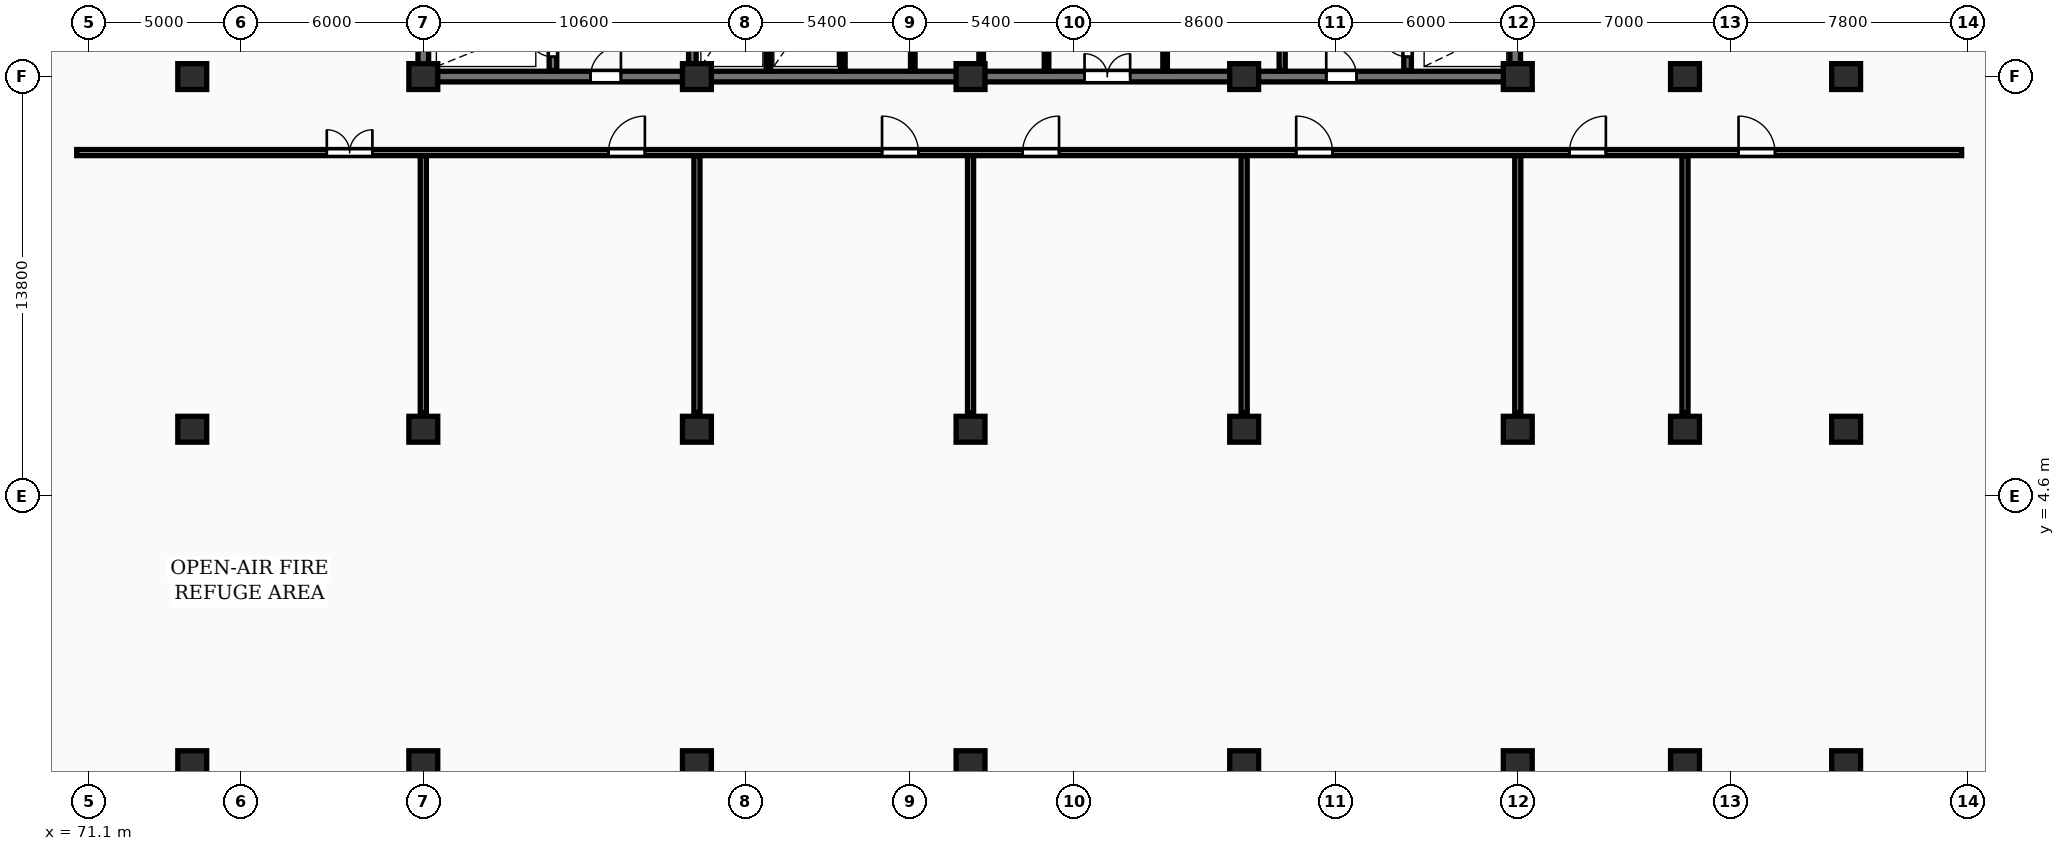
"""IFC4 building model, lengths in metres.
Left out: names, types, materials, properties, quantities, classifications, styles, units other than length and angle.
Written with IfcOpenShell. Run it as: python <this file> out.ifc"""

import sys

from ifc_helpers import new_model, si_unit, direction, frame, frame_2d, origin, origin_2d, place, context, subcontext, project, spatial, rectangle, extrude, element, fill, save


model = new_model("IFC4")
c1 = context("Model", 3, precision=1e-05, world=origin(), true_north=direction((0.0, 1.0)))
c2 = subcontext(c1, "Body", "Model", "MODEL_VIEW")
j1 = project(units=[si_unit("LENGTHUNIT", "METRE"), si_unit("PLANEANGLEUNIT", "RADIAN")], contexts=[c1])
p1 = place(None, origin())
s1 = spatial("IfcSite", under=j1, at=p1, CompositionType="ELEMENT")
p2 = place(p1, origin())
s2 = spatial("IfcBuilding", under=s1, at=p2, CompositionType="ELEMENT")
p3 = place(p2, frame((0.0, 0.0, 76.0)))
s3 = spatial("IfcBuildingStorey", under=s2, at=p3, CompositionType="ELEMENT", Elevation=76.0)
for number, where, z_axis, x_axis in (
    (1, (74.5, -4.2, 0.0), (0.0, 0.0, 1.0), (1.0, 0.0, 0.0)),
    (2, (74.5, 6.8, 0.0), (0.0, 0.0, 1.0), (1.0, 0.0, 0.0)),
    (3, (74.5, 18.4, 0.0), (0.0, 0.0, 1.0), (1.0, 0.0, 0.0)),
    (4, (82.1, -4.2, 0.0), (0.0, 0.0, 1.0), (1.0, 0.0, 0.0)),
    (5, (82.1, 6.8, 0.0), (0.0, 0.0, 1.0), (1.0, 0.0, 0.0)),
    (6, (82.1, 18.4, 0.0), (0.0, 0.0, 1.0), (1.0, 0.0, 0.0)),
    (7, (91.1, -4.2, 0.0), (0.0, 0.0, 1.0), (1.0, 0.0, 0.0)),
    (8, (91.1, 6.8, 0.0), (0.0, 0.0, 1.0), (1.0, 0.0, 0.0)),
    (9, (91.1, 18.4, 0.0), (0.0, 0.0, 1.0), (1.0, 0.0, 0.0)),
    (10, (100.1, -4.2, 0.0), (0.0, 0.0, 1.0), (1.0, 0.0, 0.0)),
    (11, (100.1, 6.8, 0.0), (0.0, 0.0, 1.0), (1.0, 0.0, 0.0)),
    (12, (100.1, 18.4, 0.0), (0.0, 0.0, 1.0), (1.0, 0.0, 0.0)),
    (13, (109.1, -4.2, 0.0), (0.0, 0.0, 1.0), (1.0, 0.0, 0.0)),
    (14, (109.1, 6.8, 0.0), (0.0, 0.0, 1.0), (1.0, 0.0, 0.0)),
    (15, (109.1, 18.4, 0.0), (0.0, 0.0, 1.0), (1.0, 0.0, 0.0)),
    (16, (118.1, -4.2, 0.0), (0.0, 0.0, 1.0), (1.0, 0.0, 0.0)),
    (17, (118.1, 6.8, 0.0), (0.0, 0.0, 1.0), (1.0, 0.0, 0.0)),
    (18, (118.1, 18.4, 0.0), (0.0, 0.0, 1.0), (1.0, 0.0, 0.0)),
    (19, (123.6, -4.2, 0.0), (0.0, 0.0, 1.0), (1.0, 0.0, 0.0)),
    (20, (123.6, 6.8, 0.0), (0.0, 0.0, 1.0), (1.0, 0.0, 0.0)),
    (21, (123.6, 18.4, 0.0), (0.0, 0.0, 1.0), (1.0, 0.0, 0.0)),
    (22, (128.9, -4.2, 0.0), (0.0, 0.0, 1.0), (1.0, 0.0, 0.0)),
    (23, (128.9, 6.8, 0.0), (0.0, 0.0, 1.0), (1.0, 0.0, 0.0)),
    (24, (128.9, 18.4, 0.0), (0.0, 0.0, 1.0), (1.0, 0.0, 0.0)),
):
    element("IfcColumn", number, at=place(p3, frame(where, z_axis=z_axis, x_axis=x_axis)), inside=s3, PredefinedType="COLUMN", context=c2, shape_type="SweptSolid", body=[
        extrude(rectangle(XDim=0.95, YDim=0.85, at=origin_2d()), origin(), (0.0, 0.0, 1.0), 4.8),
    ])
for number, where, z_axis, x_axis in (
    (25, (82.1, 18.575, 0.0), (0.0, 0.0, 1.0), (0.0, 1.0, 0.0)),
    (26, (118.015, 18.575, 0.0), (0.0, 0.0, 1.0), (0.0, 1.0, 0.0)),
):
    element("IfcWall", number, at=place(p3, frame(where, z_axis=z_axis, x_axis=x_axis)), inside=s3, PredefinedType="SHEAR", context=c2, shape_type="SweptSolid", body=[
        extrude(rectangle(XDim=11.65, YDim=0.35, at=frame_2d((5.825, 0.0))), origin(), (0.0, 0.0, 1.0), 4.8),
    ])
p4 = place(p3, frame((81.925, 18.4, 0.0), z_axis=(0.0, 0.0, 1.0), x_axis=(1.0, 0.0, 0.0)))
e27 = element("IfcWall", 27, at=p4, inside=s3, PredefinedType="SHEAR", context=c2, shape_type="SweptSolid", body=[
    extrude(rectangle(XDim=36.265, YDim=0.35, at=frame_2d((18.132, 0.0))), origin(), (0.0, 0.0, 1.0), 4.8),
])
p5 = place(p4, frame((5.675, 0.0, 0.0)))
e28 = element("IfcOpeningElement", 28, at=p5, cuts=e27, PredefinedType="OPENING", context=c2, shape_type="SweptSolid", body=[
    extrude(rectangle(XDim=1.0, YDim=2.15, at=frame_2d((0.5, 1.075))), frame((0.0, 0.185, 0.0), z_axis=(0.0, -1.0, 0.0), x_axis=(1.0, 0.0, 0.0)), (0.0, 0.0, 1.0), 0.37),
])
p6 = place(p4, frame((21.925, 0.0, 0.0)))
e29 = element("IfcOpeningElement", 29, at=p6, cuts=e27, PredefinedType="OPENING", context=c2, shape_type="SweptSolid", body=[
    extrude(rectangle(XDim=1.5, YDim=2.2, at=frame_2d((0.75, 1.1))), frame((0.0, 0.185, 0.0), z_axis=(0.0, -1.0, 0.0), x_axis=(1.0, 0.0, 0.0)), (0.0, 0.0, 1.0), 0.37),
])
p7 = place(p4, frame((29.875, 0.0, 0.0)))
e30 = element("IfcOpeningElement", 30, at=p7, cuts=e27, PredefinedType="OPENING", context=c2, shape_type="SweptSolid", body=[
    extrude(rectangle(XDim=1.0, YDim=2.15, at=frame_2d((0.5, 1.075))), frame((0.0, 0.185, 0.0), z_axis=(0.0, -1.0, 0.0), x_axis=(1.0, 0.0, 0.0)), (0.0, 0.0, 1.0), 0.37),
])
p8 = place(p3, frame((86.365, 18.6, 0.0), z_axis=(0.0, 0.0, 1.0), x_axis=(0.0, 1.0, 0.0)))
e31 = element("IfcWall", 31, at=p8, inside=s3, PredefinedType="SHEAR", context=c2, shape_type="SweptSolid", body=[
    extrude(rectangle(XDim=11.6, YDim=0.25, at=frame_2d((5.8, 0.0))), origin(), (0.0, 0.0, 1.0), 4.8),
])
p9 = place(p8, frame((0.45, 0.0, 0.0)))
e32 = element("IfcOpeningElement", 32, at=p9, cuts=e31, PredefinedType="OPENING", context=c2, shape_type="SweptSolid", body=[
    extrude(rectangle(XDim=0.85, YDim=2.05, at=frame_2d((0.425, 1.025))), frame((0.0, 0.135, 0.0), z_axis=(0.0, -1.0, 0.0), x_axis=(1.0, 0.0, 0.0)), (0.0, 0.0, 1.0), 0.27),
])
p10 = place(p8, frame((2.05, 0.0, 0.0)))
e33 = element("IfcOpeningElement", 33, at=p10, cuts=e31, PredefinedType="OPENING", context=c2, shape_type="SweptSolid", body=[
    extrude(rectangle(XDim=1.1, YDim=2.1, at=frame_2d((0.55, 1.05))), frame((0.0, 0.135, 0.0), z_axis=(0.0, -1.0, 0.0), x_axis=(1.0, 0.0, 0.0)), (0.0, 0.0, 1.0), 0.27),
])
p11 = place(p8, frame((9.95, 0.0, 0.0)))
e34 = element("IfcOpeningElement", 34, at=p11, cuts=e31, PredefinedType="OPENING", context=c2, shape_type="SweptSolid", body=[
    extrude(rectangle(XDim=0.85, YDim=2.05, at=frame_2d((0.425, 1.025))), frame((0.0, 0.135, 0.0), z_axis=(0.0, -1.0, 0.0), x_axis=(1.0, 0.0, 0.0)), (0.0, 0.0, 1.0), 0.27),
])
p12 = place(p3, frame((90.95, 18.6, 0.0), z_axis=(0.0, 0.0, 1.0), x_axis=(0.0, 1.0, 0.0)))
e35 = element("IfcWall", 35, at=p12, inside=s3, PredefinedType="SHEAR", context=c2, shape_type="SweptSolid", body=[
    extrude(rectangle(XDim=11.6, YDim=0.25, at=frame_2d((5.8, 0.0))), origin(), (0.0, 0.0, 1.0), 4.8),
])
p13 = place(p12, frame((4.6, 0.0, 0.0)))
e36 = element("IfcOpeningElement", 36, at=p13, cuts=e35, PredefinedType="OPENING", context=c2, shape_type="SweptSolid", body=[
    extrude(rectangle(XDim=1.1, YDim=2.1, at=frame_2d((0.55, 1.05))), frame((0.0, 0.135, 0.0), z_axis=(0.0, -1.0, 0.0), x_axis=(1.0, 0.0, 0.0)), (0.0, 0.0, 1.0), 0.27),
])
for number, where, z_axis, x_axis in (
    (37, (93.45, 18.6, 0.0), (0.0, 0.0, 1.0), (0.0, 1.0, 0.0)),
    (38, (95.9, 18.6, 0.0), (0.0, 0.0, 1.0), (0.0, 1.0, 0.0)),
    (39, (98.2, 18.6, 0.0), (0.0, 0.0, 1.0), (0.0, 1.0, 0.0)),
):
    element("IfcWall", number, at=place(p3, frame(where, z_axis=z_axis, x_axis=x_axis)), inside=s3, PredefinedType="PARTITIONING", context=c2, shape_type="SweptSolid", body=[
        extrude(rectangle(XDim=3.6, YDim=0.15, at=frame_2d((1.8, 0.0))), origin(), (0.0, 0.0, 1.0), 4.48),
    ])
p14 = place(p3, frame((100.45, 18.6, 0.0), z_axis=(0.0, 0.0, 1.0), x_axis=(0.0, 1.0, 0.0)))
e40 = element("IfcWall", 40, at=p14, inside=s3, PredefinedType="PARTITIONING", context=c2, shape_type="SweptSolid", body=[
    extrude(rectangle(XDim=3.6, YDim=0.15, at=frame_2d((1.8, 0.0))), origin(), (0.0, 0.0, 1.0), 3.33),
])
for number, where, z_axis, x_axis in (
    (41, (102.6, 18.6, 0.0), (0.0, 0.0, 1.0), (0.0, 1.0, 0.0)),
    (42, (106.5, 18.6, 0.0), (0.0, 0.0, 1.0), (0.0, 1.0, 0.0)),
):
    element("IfcWall", number, at=place(p3, frame(where, z_axis=z_axis, x_axis=x_axis)), inside=s3, PredefinedType="PARTITIONING", context=c2, shape_type="SweptSolid", body=[
        extrude(rectangle(XDim=3.6, YDim=0.15, at=frame_2d((1.8, 0.0))), origin(), (0.0, 0.0, 1.0), 4.48),
    ])
p15 = place(p3, frame((110.35, 18.6, 0.0), z_axis=(0.0, 0.0, 1.0), x_axis=(0.0, 1.0, 0.0)))
e43 = element("IfcWall", 43, at=p15, inside=s3, PredefinedType="PARTITIONING", context=c2, shape_type="SweptSolid", body=[
    extrude(rectangle(XDim=11.6, YDim=0.2, at=frame_2d((5.8, 0.0))), origin(), (0.0, 0.0, 1.0), 4.48),
])
p16 = place(p15, frame((5.2, 0.0, 0.0)))
e44 = element("IfcOpeningElement", 44, at=p16, cuts=e43, PredefinedType="OPENING", context=c2, shape_type="SweptSolid", body=[
    extrude(rectangle(XDim=1.1, YDim=2.15, at=frame_2d((0.55, 1.075))), frame((0.0, 0.11, 0.0), z_axis=(0.0, -1.0, 0.0), x_axis=(1.0, 0.0, 0.0)), (0.0, 0.0, 1.0), 0.22),
])
p17 = place(p3, frame((114.475, 18.6, 0.0), z_axis=(0.0, 0.0, 1.0), x_axis=(0.0, 1.0, 0.0)))
e45 = element("IfcWall", 45, at=p17, inside=s3, PredefinedType="SHEAR", context=c2, shape_type="SweptSolid", body=[
    extrude(rectangle(XDim=11.6, YDim=0.25, at=frame_2d((5.8, 0.0))), origin(), (0.0, 0.0, 1.0), 4.8),
])
p18 = place(p17, frame((0.45, 0.0, 0.0)))
e46 = element("IfcOpeningElement", 46, at=p18, cuts=e45, PredefinedType="OPENING", context=c2, shape_type="SweptSolid", body=[
    extrude(rectangle(XDim=0.85, YDim=2.05, at=frame_2d((0.425, 1.025))), frame((0.0, 0.135, 0.0), z_axis=(0.0, -1.0, 0.0), x_axis=(1.0, 0.0, 0.0)), (0.0, 0.0, 1.0), 0.27),
])
p19 = place(p17, frame((2.05, 0.0, 0.0)))
e47 = element("IfcOpeningElement", 47, at=p19, cuts=e45, PredefinedType="OPENING", context=c2, shape_type="SweptSolid", body=[
    extrude(rectangle(XDim=1.1, YDim=2.1, at=frame_2d((0.55, 1.05))), frame((0.0, 0.135, 0.0), z_axis=(0.0, -1.0, 0.0), x_axis=(1.0, 0.0, 0.0)), (0.0, 0.0, 1.0), 0.27),
])
p20 = place(p17, frame((9.95, 0.0, 0.0)))
e48 = element("IfcOpeningElement", 48, at=p20, cuts=e45, PredefinedType="OPENING", context=c2, shape_type="SweptSolid", body=[
    extrude(rectangle(XDim=0.85, YDim=2.05, at=frame_2d((0.425, 1.025))), frame((0.0, 0.135, 0.0), z_axis=(0.0, -1.0, 0.0), x_axis=(1.0, 0.0, 0.0)), (0.0, 0.0, 1.0), 0.27),
])
for number, where, z_axis, x_axis in (
    (49, (82.1, 7.35, 0.0), (0.0, 0.0, 1.0), (0.0, 1.0, 0.0)),
    (50, (91.1, 7.35, 0.0), (0.0, 0.0, 1.0), (0.0, 1.0, 0.0)),
    (51, (100.1, 7.35, 0.0), (0.0, 0.0, 1.0), (0.0, 1.0, 0.0)),
    (52, (109.1, 7.35, 0.0), (0.0, 0.0, 1.0), (0.0, 1.0, 0.0)),
    (53, (118.1, 7.35, 0.0), (0.0, 0.0, 1.0), (0.0, 1.0, 0.0)),
    (54, (123.6, 7.35, 0.0), (0.0, 0.0, 1.0), (0.0, 1.0, 0.0)),
):
    element("IfcWall", number, at=place(p3, frame(where, z_axis=z_axis, x_axis=x_axis)), inside=s3, PredefinedType="PARTITIONING", context=c2, shape_type="SweptSolid", body=[
        extrude(rectangle(XDim=8.45, YDim=0.2, at=frame_2d((4.225, 0.0))), origin(), (0.0, 0.0, 1.0), 3.33),
    ])
p21 = place(p3, frame((70.7, 15.9, 0.0), z_axis=(0.0, 0.0, 1.0), x_axis=(1.0, 0.0, 0.0)))
e55 = element("IfcWall", 55, at=p21, inside=s3, PredefinedType="PARTITIONING", context=c2, shape_type="SweptSolid", body=[
    extrude(rectangle(XDim=62.0, YDim=0.2, at=frame_2d((31.0, 0.0))), origin(), (0.0, 0.0, 1.0), 4.48),
])
p22 = place(p21, frame((8.226, 0.0, 0.0)))
e56 = element("IfcOpeningElement", 56, at=p22, cuts=e55, PredefinedType="OPENING", context=c2, shape_type="SweptSolid", body=[
    extrude(rectangle(XDim=1.5, YDim=2.18, at=frame_2d((0.75, 1.09))), frame((0.0, 0.11, 0.0), z_axis=(0.0, -1.0, 0.0), x_axis=(1.0, 0.0, 0.0)), (0.0, 0.0, 1.0), 0.22),
])
p23 = place(p21, frame((17.489, 0.0, 0.0)))
e57 = element("IfcOpeningElement", 57, at=p23, cuts=e55, PredefinedType="OPENING", context=c2, shape_type="SweptSolid", body=[
    extrude(rectangle(XDim=1.2, YDim=2.15, at=frame_2d((0.6, 1.075))), frame((0.0, 0.11, 0.0), z_axis=(0.0, -1.0, 0.0), x_axis=(1.0, 0.0, 0.0)), (0.0, 0.0, 1.0), 0.22),
])
p24 = place(p21, frame((26.489, 0.0, 0.0)))
e58 = element("IfcOpeningElement", 58, at=p24, cuts=e55, PredefinedType="OPENING", context=c2, shape_type="SweptSolid", body=[
    extrude(rectangle(XDim=1.2, YDim=2.15, at=frame_2d((0.6, 1.075))), frame((0.0, 0.11, 0.0), z_axis=(0.0, -1.0, 0.0), x_axis=(1.0, 0.0, 0.0)), (0.0, 0.0, 1.0), 0.22),
])
p25 = place(p21, frame((31.111, 0.0, 0.0)))
e59 = element("IfcOpeningElement", 59, at=p25, cuts=e55, PredefinedType="OPENING", context=c2, shape_type="SweptSolid", body=[
    extrude(rectangle(XDim=1.2, YDim=2.15, at=frame_2d((0.6, 1.075))), frame((0.0, 0.11, 0.0), z_axis=(0.0, -1.0, 0.0), x_axis=(1.0, 0.0, 0.0)), (0.0, 0.0, 1.0), 0.22),
])
p26 = place(p21, frame((40.111, 0.0, 0.0)))
e60 = element("IfcOpeningElement", 60, at=p26, cuts=e55, PredefinedType="OPENING", context=c2, shape_type="SweptSolid", body=[
    extrude(rectangle(XDim=1.2, YDim=2.15, at=frame_2d((0.6, 1.075))), frame((0.0, 0.11, 0.0), z_axis=(0.0, -1.0, 0.0), x_axis=(1.0, 0.0, 0.0)), (0.0, 0.0, 1.0), 0.22),
])
p27 = place(p21, frame((49.098, 0.0, 0.0)))
e61 = element("IfcOpeningElement", 61, at=p27, cuts=e55, PredefinedType="OPENING", context=c2, shape_type="SweptSolid", body=[
    extrude(rectangle(XDim=1.2, YDim=2.15, at=frame_2d((0.6, 1.075))), frame((0.0, 0.11, 0.0), z_axis=(0.0, -1.0, 0.0), x_axis=(1.0, 0.0, 0.0)), (0.0, 0.0, 1.0), 0.22),
])
p28 = place(p21, frame((54.662, 0.0, 0.0)))
e62 = element("IfcOpeningElement", 62, at=p28, cuts=e55, PredefinedType="OPENING", context=c2, shape_type="SweptSolid", body=[
    extrude(rectangle(XDim=1.2, YDim=2.15, at=frame_2d((0.6, 1.075))), frame((0.0, 0.11, 0.0), z_axis=(0.0, -1.0, 0.0), x_axis=(1.0, 0.0, 0.0)), (0.0, 0.0, 1.0), 0.22),
])
p29 = place(p5, origin())
e63 = element("IfcDoor", 63, at=p29, inside=s3, OperationType="SINGLE_SWING_RIGHT", PredefinedType="DOOR", context=c2, shape_type="SweptSolid", body=[
    extrude(rectangle(XDim=1.0, YDim=2.15, at=frame_2d((0.5, 1.075))), frame((0.0, 0.025, 0.0), z_axis=(0.0, -1.0, 0.0), x_axis=(1.0, 0.0, 0.0)), (0.0, 0.0, 1.0), 0.05),
])
fill(e28, e63)
p30 = place(p6, origin())
e64 = element("IfcDoor", 64, at=p30, inside=s3, OperationType="DOUBLE_DOOR_SINGLE_SWING", PredefinedType="DOOR", context=c2, shape_type="SweptSolid", body=[
    extrude(rectangle(XDim=1.5, YDim=2.2, at=frame_2d((0.75, 1.1))), frame((0.0, 0.025, 0.0), z_axis=(0.0, -1.0, 0.0), x_axis=(1.0, 0.0, 0.0)), (0.0, 0.0, 1.0), 0.05),
])
fill(e29, e64)
p31 = place(p7, origin())
e65 = element("IfcDoor", 65, at=p31, inside=s3, OperationType="SINGLE_SWING_LEFT", PredefinedType="DOOR", context=c2, shape_type="SweptSolid", body=[
    extrude(rectangle(XDim=1.0, YDim=2.15, at=frame_2d((0.5, 1.075))), frame((0.0, 0.025, 0.0), z_axis=(0.0, -1.0, 0.0), x_axis=(1.0, 0.0, 0.0)), (0.0, 0.0, 1.0), 0.05),
])
fill(e30, e65)
p32 = place(p9, origin())
e66 = element("IfcDoor", 66, at=p32, inside=s3, OperationType="SINGLE_SWING_RIGHT", PredefinedType="DOOR", context=c2, shape_type="SweptSolid", body=[
    extrude(rectangle(XDim=0.85, YDim=2.05, at=frame_2d((0.425, 1.025))), frame((0.0, 0.025, 0.0), z_axis=(0.0, -1.0, 0.0), x_axis=(1.0, 0.0, 0.0)), (0.0, 0.0, 1.0), 0.05),
])
fill(e32, e66)
p33 = place(p18, origin())
e67 = element("IfcDoor", 67, at=p33, inside=s3, OperationType="SINGLE_SWING_RIGHT", PredefinedType="DOOR", context=c2, shape_type="SweptSolid", body=[
    extrude(rectangle(XDim=0.85, YDim=2.05, at=frame_2d((0.425, 1.025))), frame((0.0, 0.025, 0.0), z_axis=(0.0, -1.0, 0.0), x_axis=(1.0, 0.0, 0.0)), (0.0, 0.0, 1.0), 0.05),
])
fill(e46, e67)
p34 = place(p22, origin())
e68 = element("IfcDoor", 68, at=p34, inside=s3, OperationType="DOUBLE_DOOR_SINGLE_SWING", PredefinedType="DOOR", context=c2, shape_type="SweptSolid", body=[
    extrude(rectangle(XDim=1.5, YDim=2.18, at=frame_2d((0.75, 1.09))), frame((0.0, 0.025, 0.0), z_axis=(0.0, -1.0, 0.0), x_axis=(1.0, 0.0, 0.0)), (0.0, 0.0, 1.0), 0.05),
])
fill(e56, e68)
p35 = place(p23, origin())
e69 = element("IfcDoor", 69, at=p35, inside=s3, OperationType="SINGLE_SWING_RIGHT", PredefinedType="DOOR", context=c2, shape_type="SweptSolid", body=[
    extrude(rectangle(XDim=1.2, YDim=2.15, at=frame_2d((0.6, 1.075))), frame((0.0, 0.025, 0.0), z_axis=(0.0, -1.0, 0.0), x_axis=(1.0, 0.0, 0.0)), (0.0, 0.0, 1.0), 0.05),
])
fill(e57, e69)
p36 = place(p24, origin())
e70 = element("IfcDoor", 70, at=p36, inside=s3, OperationType="SINGLE_SWING_LEFT", PredefinedType="DOOR", context=c2, shape_type="SweptSolid", body=[
    extrude(rectangle(XDim=1.2, YDim=2.15, at=frame_2d((0.6, 1.075))), frame((0.0, 0.025, 0.0), z_axis=(0.0, -1.0, 0.0), x_axis=(1.0, 0.0, 0.0)), (0.0, 0.0, 1.0), 0.05),
])
fill(e58, e70)
p37 = place(p25, origin())
e71 = element("IfcDoor", 71, at=p37, inside=s3, OperationType="SINGLE_SWING_RIGHT", PredefinedType="DOOR", context=c2, shape_type="SweptSolid", body=[
    extrude(rectangle(XDim=1.2, YDim=2.15, at=frame_2d((0.6, 1.075))), frame((0.0, 0.025, 0.0), z_axis=(0.0, -1.0, 0.0), x_axis=(1.0, 0.0, 0.0)), (0.0, 0.0, 1.0), 0.05),
])
fill(e59, e71)
p38 = place(p26, origin())
e72 = element("IfcDoor", 72, at=p38, inside=s3, OperationType="SINGLE_SWING_LEFT", PredefinedType="DOOR", context=c2, shape_type="SweptSolid", body=[
    extrude(rectangle(XDim=1.2, YDim=2.15, at=frame_2d((0.6, 1.075))), frame((0.0, 0.025, 0.0), z_axis=(0.0, -1.0, 0.0), x_axis=(1.0, 0.0, 0.0)), (0.0, 0.0, 1.0), 0.05),
])
fill(e60, e72)
p39 = place(p27, origin())
e73 = element("IfcDoor", 73, at=p39, inside=s3, OperationType="SINGLE_SWING_RIGHT", PredefinedType="DOOR", context=c2, shape_type="SweptSolid", body=[
    extrude(rectangle(XDim=1.2, YDim=2.15, at=frame_2d((0.6, 1.075))), frame((0.0, 0.025, 0.0), z_axis=(0.0, -1.0, 0.0), x_axis=(1.0, 0.0, 0.0)), (0.0, 0.0, 1.0), 0.05),
])
fill(e61, e73)
p40 = place(p28, origin())
e74 = element("IfcDoor", 74, at=p40, inside=s3, OperationType="SINGLE_SWING_LEFT", PredefinedType="DOOR", context=c2, shape_type="SweptSolid", body=[
    extrude(rectangle(XDim=1.2, YDim=2.15, at=frame_2d((0.6, 1.075))), frame((0.0, 0.025, 0.0), z_axis=(0.0, -1.0, 0.0), x_axis=(1.0, 0.0, 0.0)), (0.0, 0.0, 1.0), 0.05),
])
fill(e62, e74)
save(model, sys.argv[1])
